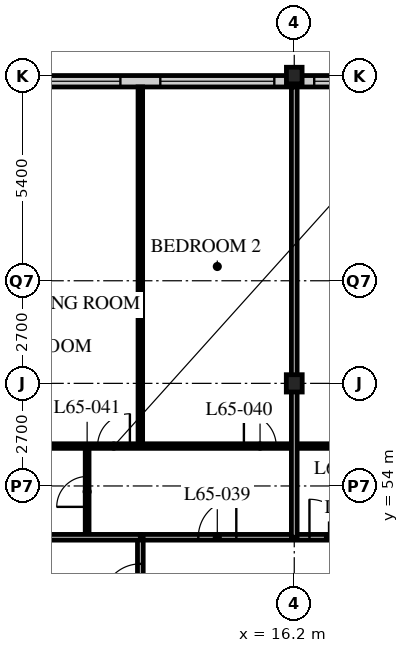
"""IFC4 building model, lengths in metres.
Left out: names, types, materials, properties, quantities, classifications, styles, units other than length and angle.
Written with IfcOpenShell. Run it as: python <this file> out.ifc"""

import sys

from ifc_helpers import new_model, si_unit, direction, frame, frame_2d, origin, origin_2d, place, context, subcontext, project, spatial, rectangle, i_section, extrude, element, fill, save


model = new_model("IFC4")
c1 = context("Model", 3, precision=1e-05, world=origin(), true_north=direction((0.0, 1.0)))
c2 = subcontext(c1, "Body", "Model", "MODEL_VIEW")
j1 = project(units=[si_unit("LENGTHUNIT", "METRE"), si_unit("PLANEANGLEUNIT", "RADIAN")], contexts=[c1])
p1 = place(None, origin())
s1 = spatial("IfcSite", under=j1, at=p1, CompositionType="ELEMENT")
p2 = place(p1, origin())
s2 = spatial("IfcBuilding", under=s1, at=p2, CompositionType="ELEMENT")
p3 = place(p2, frame((0.0, 0.0, 254.1)))
s3 = spatial("IfcBuildingStorey", under=s2, at=p3, CompositionType="ELEMENT", Elevation=254.1)
p4 = place(p3, frame((16.2, 56.7, 0.0), z_axis=(0.0, 0.0, 1.0), x_axis=(1.0, 0.0, 0.0)))
e1 = element("IfcColumn", 1, at=p4, inside=s3, PredefinedType="COLUMN", context=c2, shape_type="SweptSolid", body=[
    extrude(i_section(OverallWidth=0.418, OverallDepth=0.456, WebThickness=0.042, FlangeThickness=0.067, FilletRadius=0.015, at=origin_2d()), origin(), (0.0, 0.0, 1.0), 3.9),
])
p5 = place(p3, frame((16.2, 64.8, 0.0), z_axis=(0.0, 0.0, 1.0), x_axis=(1.0, 0.0, 0.0)))
e2 = element("IfcColumn", 2, at=p5, inside=s3, PredefinedType="COLUMN", context=c2, shape_type="SweptSolid", body=[
    extrude(i_section(OverallWidth=0.412, OverallDepth=0.437, WebThickness=0.036, FlangeThickness=0.058, FilletRadius=0.015, at=origin_2d()), origin(), (0.0, 0.0, 1.0), 3.9),
])
p6 = place(p3, frame((48.3, 64.65, 0.0), z_axis=(0.0, 0.0, 1.0), x_axis=(-1.0, 0.0, 0.0)))
e3 = element("IfcWall", 3, at=p6, inside=s3, PredefinedType="SOLIDWALL", context=c2, shape_type="SweptSolid", body=[
    extrude(rectangle(XDim=40.2, YDim=0.3, at=frame_2d((20.1, 0.0))), origin(), (0.0, 0.0, 1.0), 3.69),
])
p7 = place(p6, frame((0.225, 0.0, 0.6)))
e4 = element("IfcOpeningElement", 4, at=p7, cuts=e3, PredefinedType="OPENING", context=c2, shape_type="SweptSolid", body=[
    extrude(rectangle(XDim=3.0, YDim=2.4, at=frame_2d((1.5, 1.2))), frame((0.0, 0.16, 0.0), z_axis=(0.0, -1.0, 0.0), x_axis=(1.0, 0.0, 0.0)), (0.0, 0.0, 1.0), 0.32),
])
p8 = place(p6, frame((4.275, 0.0, 0.6)))
e5 = element("IfcOpeningElement", 5, at=p8, cuts=e3, PredefinedType="OPENING", context=c2, shape_type="SweptSolid", body=[
    extrude(rectangle(XDim=3.0, YDim=2.4, at=frame_2d((1.5, 1.2))), frame((0.0, 0.16, 0.0), z_axis=(0.0, -1.0, 0.0), x_axis=(1.0, 0.0, 0.0)), (0.0, 0.0, 1.0), 0.32),
])
p9 = place(p6, frame((8.325, 0.0, 0.6)))
e6 = element("IfcOpeningElement", 6, at=p9, cuts=e3, PredefinedType="OPENING", context=c2, shape_type="SweptSolid", body=[
    extrude(rectangle(XDim=3.0, YDim=2.4, at=frame_2d((1.5, 1.2))), frame((0.0, 0.16, 0.0), z_axis=(0.0, -1.0, 0.0), x_axis=(1.0, 0.0, 0.0)), (0.0, 0.0, 1.0), 0.32),
])
p10 = place(p6, frame((12.375, 0.0, 0.6)))
e7 = element("IfcOpeningElement", 7, at=p10, cuts=e3, PredefinedType="OPENING", context=c2, shape_type="SweptSolid", body=[
    extrude(rectangle(XDim=3.0, YDim=2.4, at=frame_2d((1.5, 1.2))), frame((0.0, 0.16, 0.0), z_axis=(0.0, -1.0, 0.0), x_axis=(1.0, 0.0, 0.0)), (0.0, 0.0, 1.0), 0.32),
])
p11 = place(p6, frame((16.425, 0.0, 0.6)))
e8 = element("IfcOpeningElement", 8, at=p11, cuts=e3, PredefinedType="OPENING", context=c2, shape_type="SweptSolid", body=[
    extrude(rectangle(XDim=3.0, YDim=2.4, at=frame_2d((1.5, 1.2))), frame((0.0, 0.16, 0.0), z_axis=(0.0, -1.0, 0.0), x_axis=(1.0, 0.0, 0.0)), (0.0, 0.0, 1.0), 0.32),
])
p12 = place(p6, frame((20.475, 0.0, 0.6)))
e9 = element("IfcOpeningElement", 9, at=p12, cuts=e3, PredefinedType="OPENING", context=c2, shape_type="SweptSolid", body=[
    extrude(rectangle(XDim=3.0, YDim=2.4, at=frame_2d((1.5, 1.2))), frame((0.0, 0.16, 0.0), z_axis=(0.0, -1.0, 0.0), x_axis=(1.0, 0.0, 0.0)), (0.0, 0.0, 1.0), 0.32),
])
p13 = place(p6, frame((24.525, 0.0, 0.6)))
e10 = element("IfcOpeningElement", 10, at=p13, cuts=e3, PredefinedType="OPENING", context=c2, shape_type="SweptSolid", body=[
    extrude(rectangle(XDim=3.0, YDim=2.4, at=frame_2d((1.5, 1.2))), frame((0.0, 0.16, 0.0), z_axis=(0.0, -1.0, 0.0), x_axis=(1.0, 0.0, 0.0)), (0.0, 0.0, 1.0), 0.32),
])
p14 = place(p6, frame((28.575, 0.0, 0.6)))
e11 = element("IfcOpeningElement", 11, at=p14, cuts=e3, PredefinedType="OPENING", context=c2, shape_type="SweptSolid", body=[
    extrude(rectangle(XDim=3.0, YDim=2.4, at=frame_2d((1.5, 1.2))), frame((0.0, 0.16, 0.0), z_axis=(0.0, -1.0, 0.0), x_axis=(1.0, 0.0, 0.0)), (0.0, 0.0, 1.0), 0.32),
])
p15 = place(p6, frame((32.625, 0.0, 0.6)))
e12 = element("IfcOpeningElement", 12, at=p15, cuts=e3, PredefinedType="OPENING", context=c2, shape_type="SweptSolid", body=[
    extrude(rectangle(XDim=3.0, YDim=2.4, at=frame_2d((1.5, 1.2))), frame((0.0, 0.16, 0.0), z_axis=(0.0, -1.0, 0.0), x_axis=(1.0, 0.0, 0.0)), (0.0, 0.0, 1.0), 0.32),
])
p16 = place(p6, frame((36.675, 0.0, 0.6)))
e13 = element("IfcOpeningElement", 13, at=p16, cuts=e3, PredefinedType="OPENING", context=c2, shape_type="SweptSolid", body=[
    extrude(rectangle(XDim=3.0, YDim=2.4, at=frame_2d((1.5, 1.2))), frame((0.0, 0.16, 0.0), z_axis=(0.0, -1.0, 0.0), x_axis=(1.0, 0.0, 0.0)), (0.0, 0.0, 1.0), 0.32),
])
p17 = place(p3, frame((12.15, 52.65, 0.0), z_axis=(0.0, 0.0, 1.0), x_axis=(1.0, 0.0, 0.0)))
e14 = element("IfcWall", 14, at=p17, inside=s3, PredefinedType="PARTITIONING", context=c2, shape_type="SweptSolid", body=[
    extrude(rectangle(XDim=24.3, YDim=0.15, at=frame_2d((12.15, 0.0))), origin(), (0.0, 0.0, 1.0), 3.69),
])
p18 = place(p17, frame((4.45, 0.0, 0.0)))
e15 = element("IfcOpeningElement", 15, at=p18, cuts=e14, PredefinedType="OPENING", context=c2, shape_type="SweptSolid", body=[
    extrude(rectangle(XDim=1.0, YDim=2.1, at=frame_2d((0.5, 1.05))), frame((0.0, 0.085, 0.0), z_axis=(0.0, -1.0, 0.0), x_axis=(1.0, 0.0, 0.0)), (0.0, 0.0, 1.0), 0.17),
])
p19 = place(p17, frame((1.525, 0.0, 0.0)))
e16 = element("IfcOpeningElement", 16, at=p19, cuts=e14, PredefinedType="OPENING", context=c2, shape_type="SweptSolid", body=[
    extrude(rectangle(XDim=1.0, YDim=2.1, at=frame_2d((0.5, 1.05))), frame((0.0, 0.085, 0.0), z_axis=(0.0, -1.0, 0.0), x_axis=(1.0, 0.0, 0.0)), (0.0, 0.0, 1.0), 0.17),
])
p20 = place(p3, frame((12.15, 22.5, 0.0), z_axis=(0.0, 0.0, 1.0), x_axis=(0.0, 1.0, 0.0)))
e17 = element("IfcWall", 17, at=p20, inside=s3, PredefinedType="PARTITIONING", context=c2, shape_type="SweptSolid", body=[
    extrude(rectangle(XDim=30.15, YDim=0.15, at=frame_2d((15.075, 0.0))), origin(), (0.0, 0.0, 1.0), 3.69),
])
p21 = place(p20, frame((0.4, 0.0, 0.0)))
e18 = element("IfcOpeningElement", 18, at=p21, cuts=e17, PredefinedType="OPENING", context=c2, shape_type="SweptSolid", body=[
    extrude(rectangle(XDim=1.0, YDim=2.1, at=frame_2d((0.5, 1.05))), frame((0.0, 0.085, 0.0), z_axis=(0.0, -1.0, 0.0), x_axis=(1.0, 0.0, 0.0)), (0.0, 0.0, 1.0), 0.17),
])
p22 = place(p20, frame((24.4, 0.0, 0.0)))
e19 = element("IfcOpeningElement", 19, at=p22, cuts=e17, PredefinedType="OPENING", context=c2, shape_type="SweptSolid", body=[
    extrude(rectangle(XDim=1.0, YDim=2.1, at=frame_2d((0.5, 1.05))), frame((0.0, 0.085, 0.0), z_axis=(0.0, -1.0, 0.0), x_axis=(1.0, 0.0, 0.0)), (0.0, 0.0, 1.0), 0.17),
])
p23 = place(p20, frame((28.45, 0.0, 0.0)))
e20 = element("IfcOpeningElement", 20, at=p23, cuts=e17, PredefinedType="OPENING", context=c2, shape_type="SweptSolid", body=[
    extrude(rectangle(XDim=1.0, YDim=2.1, at=frame_2d((0.5, 1.05))), frame((0.0, 0.085, 0.0), z_axis=(0.0, -1.0, 0.0), x_axis=(1.0, 0.0, 0.0)), (0.0, 0.0, 1.0), 0.17),
])
p24 = place(p3, frame((10.75, 52.65, 0.0), z_axis=(0.0, 0.0, 1.0), x_axis=(0.0, 1.0, 0.0)))
e21 = element("IfcWall", 21, at=p24, inside=s3, PredefinedType="PARTITIONING", context=c2, shape_type="SweptSolid", body=[
    extrude(rectangle(XDim=2.4, YDim=0.1, at=frame_2d((1.2, 0.0))), origin(), (0.0, 0.0, 1.0), 3.69),
])
p25 = place(p24, frame((0.8, 0.0, 0.0)))
e22 = element("IfcOpeningElement", 22, at=p25, cuts=e21, PredefinedType="OPENING", context=c2, shape_type="SweptSolid", body=[
    extrude(rectangle(XDim=0.8, YDim=2.1, at=frame_2d((0.4, 1.05))), frame((0.0, 0.06, 0.0), z_axis=(0.0, -1.0, 0.0), x_axis=(1.0, 0.0, 0.0)), (0.0, 0.0, 1.0), 0.12),
])
p26 = place(p3, frame((8.15, 55.05, 0.0), z_axis=(0.0, 0.0, 1.0), x_axis=(1.0, 0.0, 0.0)))
e23 = element("IfcWall", 23, at=p26, inside=s3, PredefinedType="PARTITIONING", context=c2, shape_type="SweptSolid", body=[
    extrude(rectangle(XDim=28.3, YDim=0.12, at=frame_2d((14.15, 0.0))), origin(), (0.0, 0.0, 1.0), 3.69),
])
p27 = place(p26, frame((9.025, 0.0, 0.0)))
e24 = element("IfcOpeningElement", 24, at=p27, cuts=e23, PredefinedType="OPENING", context=c2, shape_type="SweptSolid", body=[
    extrude(rectangle(XDim=0.85, YDim=2.1, at=frame_2d((0.425, 1.05))), frame((0.0, 0.07, 0.0), z_axis=(0.0, -1.0, 0.0), x_axis=(1.0, 0.0, 0.0)), (0.0, 0.0, 1.0), 0.14),
])
p28 = place(p26, frame((16.475, 0.0, 0.0)))
e25 = element("IfcOpeningElement", 25, at=p28, cuts=e23, PredefinedType="OPENING", context=c2, shape_type="SweptSolid", body=[
    extrude(rectangle(XDim=0.85, YDim=2.1, at=frame_2d((0.425, 1.05))), frame((0.0, 0.07, 0.0), z_axis=(0.0, -1.0, 0.0), x_axis=(1.0, 0.0, 0.0)), (0.0, 0.0, 1.0), 0.14),
])
p29 = place(p26, frame((20.525, 0.0, 0.0)))
e26 = element("IfcOpeningElement", 26, at=p29, cuts=e23, PredefinedType="OPENING", context=c2, shape_type="SweptSolid", body=[
    extrude(rectangle(XDim=0.85, YDim=2.1, at=frame_2d((0.425, 1.05))), frame((0.0, 0.07, 0.0), z_axis=(0.0, -1.0, 0.0), x_axis=(1.0, 0.0, 0.0)), (0.0, 0.0, 1.0), 0.14),
])
p30 = place(p26, frame((24.575, 0.0, 0.0)))
e27 = element("IfcOpeningElement", 27, at=p30, cuts=e23, PredefinedType="OPENING", context=c2, shape_type="SweptSolid", body=[
    extrude(rectangle(XDim=0.85, YDim=2.1, at=frame_2d((0.425, 1.05))), frame((0.0, 0.07, 0.0), z_axis=(0.0, -1.0, 0.0), x_axis=(1.0, 0.0, 0.0)), (0.0, 0.0, 1.0), 0.14),
])
p31 = place(p26, frame((6.725, 0.0, 0.0)))
e28 = element("IfcOpeningElement", 28, at=p31, cuts=e23, PredefinedType="OPENING", context=c2, shape_type="SweptSolid", body=[
    extrude(rectangle(XDim=0.85, YDim=2.1, at=frame_2d((0.425, 1.05))), frame((0.0, 0.07, 0.0), z_axis=(0.0, -1.0, 0.0), x_axis=(1.0, 0.0, 0.0)), (0.0, 0.0, 1.0), 0.14),
])
p32 = place(p26, frame((2.875, 0.0, 0.0)))
e29 = element("IfcOpeningElement", 29, at=p32, cuts=e23, PredefinedType="OPENING", context=c2, shape_type="SweptSolid", body=[
    extrude(rectangle(XDim=0.85, YDim=2.1, at=frame_2d((0.425, 1.05))), frame((0.0, 0.07, 0.0), z_axis=(0.0, -1.0, 0.0), x_axis=(1.0, 0.0, 0.0)), (0.0, 0.0, 1.0), 0.14),
])
p33 = place(p3, frame((12.15, 55.05, 0.0), z_axis=(0.0, 0.0, 1.0), x_axis=(0.0, 1.0, 0.0)))
e30 = element("IfcWall", 30, at=p33, inside=s3, PredefinedType="PARTITIONING", context=c2, shape_type="SweptSolid", body=[
    extrude(rectangle(XDim=9.45, YDim=0.12, at=frame_2d((4.725, 0.0))), origin(), (0.0, 0.0, 1.0), 3.69),
])
p34 = place(p3, frame((0.3, 52.65, 0.0), z_axis=(0.0, 0.0, 1.0), x_axis=(1.0, 0.0, 0.0)))
e31 = element("IfcWall", 31, at=p34, inside=s3, PredefinedType="PARTITIONING", context=c2, shape_type="SweptSolid", body=[
    extrude(rectangle(XDim=11.85, YDim=0.15, at=frame_2d((5.925, 0.0))), origin(), (0.0, 0.0, 1.0), 3.69),
])
p35 = place(p3, frame((16.2, 52.65, 0.0), z_axis=(0.0, 0.0, 1.0), x_axis=(0.0, 1.0, 0.0)))
e32 = element("IfcWall", 32, at=p35, inside=s3, PredefinedType="PARTITIONING", context=c2, shape_type="SweptSolid", body=[
    extrude(rectangle(XDim=11.85, YDim=0.15, at=frame_2d((5.925, 0.0))), origin(), (0.0, 0.0, 1.0), 3.078),
])
p36 = place(p14, origin())
e33 = element("IfcWindow", 33, at=p36, inside=s3, PartitioningType="SINGLE_PANEL", PredefinedType="WINDOW", context=c2, shape_type="SweptSolid", body=[
    extrude(rectangle(XDim=3.0, YDim=2.4, at=frame_2d((1.5, 1.2))), frame((0.0, 0.03, 0.0), z_axis=(0.0, -1.0, 0.0), x_axis=(1.0, 0.0, 0.0)), (0.0, 0.0, 1.0), 0.06),
])
fill(e11, e33)
p37 = place(p15, origin())
e34 = element("IfcWindow", 34, at=p37, inside=s3, PartitioningType="SINGLE_PANEL", PredefinedType="WINDOW", context=c2, shape_type="SweptSolid", body=[
    extrude(rectangle(XDim=3.0, YDim=2.4, at=frame_2d((1.5, 1.2))), frame((0.0, 0.03, 0.0), z_axis=(0.0, -1.0, 0.0), x_axis=(1.0, 0.0, 0.0)), (0.0, 0.0, 1.0), 0.06),
])
fill(e12, e34)
p38 = place(p16, origin())
e35 = element("IfcWindow", 35, at=p38, inside=s3, PartitioningType="SINGLE_PANEL", PredefinedType="WINDOW", context=c2, shape_type="SweptSolid", body=[
    extrude(rectangle(XDim=3.0, YDim=2.4, at=frame_2d((1.5, 1.2))), frame((0.0, 0.03, 0.0), z_axis=(0.0, -1.0, 0.0), x_axis=(1.0, 0.0, 0.0)), (0.0, 0.0, 1.0), 0.06),
])
fill(e13, e35)
p39 = place(p18, origin())
e36 = element("IfcDoor", 36, at=p39, inside=s3, OperationType="SINGLE_SWING_LEFT", PredefinedType="DOOR", context=c2, shape_type="SweptSolid", body=[
    extrude(rectangle(XDim=1.0, YDim=2.1, at=frame_2d((0.5, 1.05))), frame((0.0, 0.025, 0.0), z_axis=(0.0, -1.0, 0.0), x_axis=(1.0, 0.0, 0.0)), (0.0, 0.0, 1.0), 0.05),
])
fill(e15, e36)
p40 = place(p23, origin())
e37 = element("IfcDoor", 37, at=p40, inside=s3, OperationType="SINGLE_SWING_LEFT", PredefinedType="DOOR", context=c2, shape_type="SweptSolid", body=[
    extrude(rectangle(XDim=1.0, YDim=2.1, at=frame_2d((0.5, 1.05))), frame((0.0, 0.025, 0.0), z_axis=(0.0, -1.0, 0.0), x_axis=(1.0, 0.0, 0.0)), (0.0, 0.0, 1.0), 0.05),
])
fill(e20, e37)
p41 = place(p19, origin())
e38 = element("IfcDoor", 38, at=p41, inside=s3, OperationType="SINGLE_SWING_RIGHT", PredefinedType="DOOR", context=c2, shape_type="SweptSolid", body=[
    extrude(rectangle(XDim=1.0, YDim=2.1, at=frame_2d((0.5, 1.05))), frame((0.0, 0.025, 0.0), z_axis=(0.0, -1.0, 0.0), x_axis=(1.0, 0.0, 0.0)), (0.0, 0.0, 1.0), 0.05),
])
fill(e16, e38)
p42 = place(p31, origin())
e39 = element("IfcDoor", 39, at=p42, inside=s3, OperationType="SINGLE_SWING_LEFT", PredefinedType="DOOR", context=c2, shape_type="SweptSolid", body=[
    extrude(rectangle(XDim=0.85, YDim=2.1, at=frame_2d((0.425, 1.05))), frame((0.0, 0.025, 0.0), z_axis=(0.0, -1.0, 0.0), x_axis=(1.0, 0.0, 0.0)), (0.0, 0.0, 1.0), 0.05),
])
fill(e28, e39)
p43 = place(p25, origin())
e40 = element("IfcDoor", 40, at=p43, inside=s3, OperationType="SINGLE_SWING_LEFT", PredefinedType="DOOR", context=c2, shape_type="SweptSolid", body=[
    extrude(rectangle(XDim=0.8, YDim=2.1, at=frame_2d((0.4, 1.05))), frame((0.0, 0.025, 0.0), z_axis=(0.0, -1.0, 0.0), x_axis=(1.0, 0.0, 0.0)), (0.0, 0.0, 1.0), 0.05),
])
fill(e22, e40)
p44 = place(p32, origin())
e41 = element("IfcDoor", 41, at=p44, inside=s3, OperationType="SINGLE_SWING_RIGHT", PredefinedType="DOOR", context=c2, shape_type="SweptSolid", body=[
    extrude(rectangle(XDim=0.85, YDim=2.1, at=frame_2d((0.425, 1.05))), frame((0.0, 0.025, 0.0), z_axis=(0.0, -1.0, 0.0), x_axis=(1.0, 0.0, 0.0)), (0.0, 0.0, 1.0), 0.05),
])
fill(e29, e41)
save(model, sys.argv[1])
